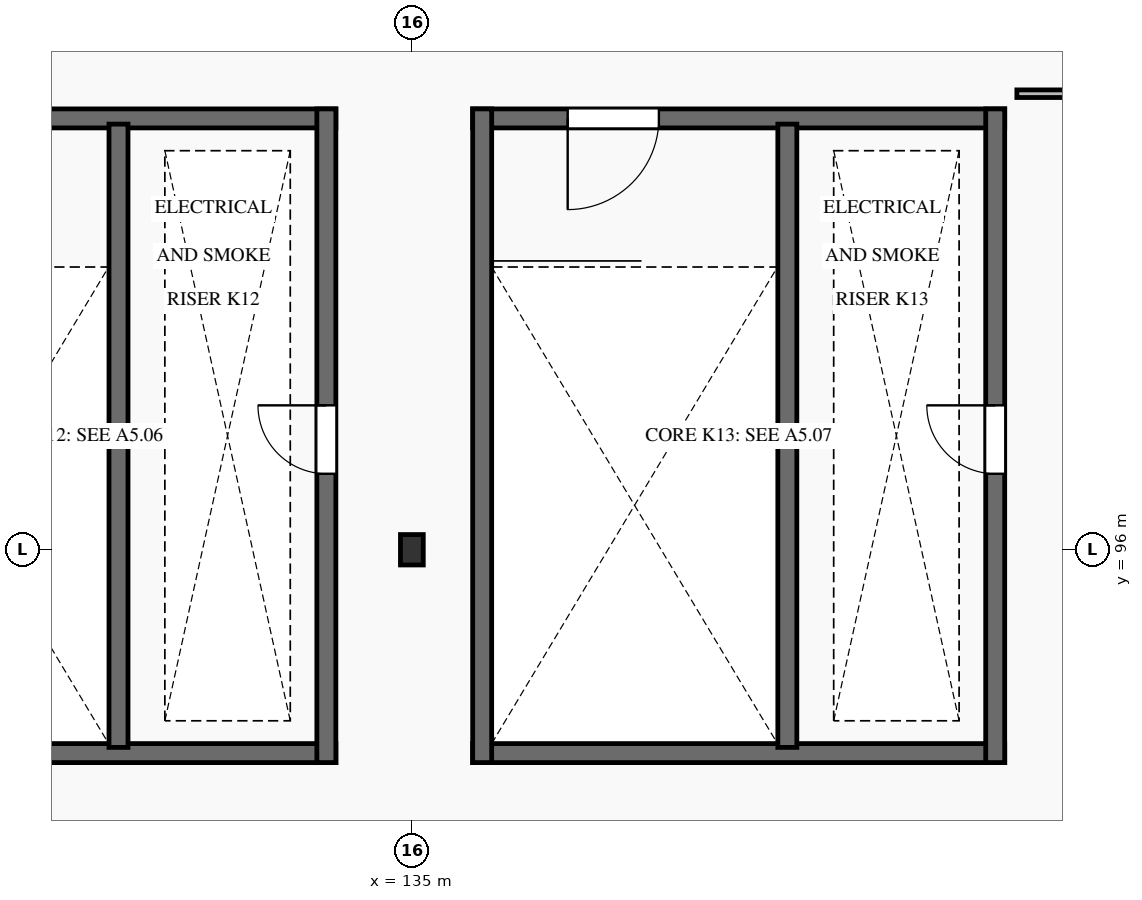
"""IFC4 building model, lengths in metres.
Left out: names, types, materials, properties, quantities, classifications, styles, units other than length and angle.
Written with IfcOpenShell. Run it as: python <this file> out.ifc"""

import sys

from ifc_helpers import new_model, si_unit, direction, frame, frame_2d, origin, origin_2d, place, context, subcontext, project, spatial, rectangle, i_section, extrude, element, fill, save


model = new_model("IFC4")
c1 = context("Model", 3, precision=1e-05, world=origin(), true_north=direction((0.0, 1.0)))
c2 = subcontext(c1, "Body", "Model", "MODEL_VIEW")
j1 = project(units=[si_unit("LENGTHUNIT", "METRE"), si_unit("PLANEANGLEUNIT", "RADIAN")], contexts=[c1])
p1 = place(None, origin())
s1 = spatial("IfcSite", under=j1, at=p1, CompositionType="ELEMENT")
p2 = place(p1, origin())
s2 = spatial("IfcBuilding", under=s1, at=p2, CompositionType="ELEMENT")
p3 = place(p2, frame((0.0, 0.0, 15.0)))
s3 = spatial("IfcBuildingStorey", under=s2, at=p3, CompositionType="ELEMENT", Elevation=15.0)
p4 = place(p3, frame((135.0, 96.0, 0.0), z_axis=(0.0, 0.0, 1.0), x_axis=(1.0, 0.0, 0.0)))
e1 = element("IfcColumn", 1, at=p4, inside=s3, PredefinedType="COLUMN", context=c2, shape_type="SweptSolid", body=[
    extrude(i_section(OverallWidth=0.3, OverallDepth=0.4, WebThickness=0.013, FlangeThickness=0.024, FilletRadius=0.027, at=origin_2d()), origin(), (0.0, 0.0, 1.0), 3.9),
])
p5 = place(p3, frame((127.0, 93.325, 0.0), z_axis=(0.0, 0.0, 1.0), x_axis=(1.0, 0.0, 0.0)))
e2 = element("IfcWall", 2, at=p5, inside=s3, PredefinedType="SHEAR", context=c2, shape_type="SweptSolid", body=[
    extrude(rectangle(XDim=7.0, YDim=0.25, at=frame_2d((3.5, 0.0))), origin(), (0.0, 0.0, 1.0), 3.9),
])
p6 = place(p3, frame((127.0, 101.675, 0.0), z_axis=(0.0, 0.0, 1.0), x_axis=(1.0, 0.0, 0.0)))
e3 = element("IfcWall", 3, at=p6, inside=s3, PredefinedType="SHEAR", context=c2, shape_type="SweptSolid", body=[
    extrude(rectangle(XDim=7.0, YDim=0.25, at=frame_2d((3.5, 0.0))), origin(), (0.0, 0.0, 1.0), 3.9),
])
p7 = place(p6, frame((1.25, 0.0, 0.0)))
e4 = element("IfcOpeningElement", 4, at=p7, cuts=e3, PredefinedType="OPENING", context=c2, shape_type="SweptSolid", body=[
    extrude(rectangle(XDim=1.2, YDim=2.15, at=frame_2d((0.6, 1.075))), frame((0.0, 0.14, 0.0), z_axis=(0.0, -1.0, 0.0), x_axis=(1.0, 0.0, 0.0)), (0.0, 0.0, 1.0), 0.28),
])
p8 = place(p3, frame((133.875, 93.2, 0.0), z_axis=(0.0, 0.0, 1.0), x_axis=(0.0, 1.0, 0.0)))
e5 = element("IfcWall", 5, at=p8, inside=s3, PredefinedType="SHEAR", context=c2, shape_type="SweptSolid", body=[
    extrude(rectangle(XDim=8.6, YDim=0.25, at=frame_2d((4.3, 0.0))), origin(), (0.0, 0.0, 1.0), 3.9),
])
p9 = place(p8, frame((3.8, 0.0, 0.0)))
e6 = element("IfcOpeningElement", 6, at=p9, cuts=e5, PredefinedType="OPENING", context=c2, shape_type="SweptSolid", body=[
    extrude(rectangle(XDim=0.9, YDim=2.05, at=frame_2d((0.45, 1.025))), frame((0.0, 0.14, 0.0), z_axis=(0.0, -1.0, 0.0), x_axis=(1.0, 0.0, 0.0)), (0.0, 0.0, 1.0), 0.28),
])
p10 = place(p3, frame((131.14, 93.4, 0.0), z_axis=(0.0, 0.0, 1.0), x_axis=(0.0, 1.0, 0.0)))
e7 = element("IfcWall", 7, at=p10, inside=s3, PredefinedType="SHEAR", context=c2, shape_type="SweptSolid", body=[
    extrude(rectangle(XDim=8.2, YDim=0.25, at=frame_2d((4.1, 0.0))), origin(), (0.0, 0.0, 1.0), 3.9),
])
p11 = place(p3, frame((135.8, 93.325, 0.0), z_axis=(0.0, 0.0, 1.0), x_axis=(1.0, 0.0, 0.0)))
e8 = element("IfcWall", 8, at=p11, inside=s3, PredefinedType="SHEAR", context=c2, shape_type="SweptSolid", body=[
    extrude(rectangle(XDim=7.0, YDim=0.25, at=frame_2d((3.5, 0.0))), origin(), (0.0, 0.0, 1.0), 3.9),
])
p12 = place(p3, frame((135.8, 101.675, 0.0), z_axis=(0.0, 0.0, 1.0), x_axis=(1.0, 0.0, 0.0)))
e9 = element("IfcWall", 9, at=p12, inside=s3, PredefinedType="SHEAR", context=c2, shape_type="SweptSolid", body=[
    extrude(rectangle(XDim=7.0, YDim=0.25, at=frame_2d((3.5, 0.0))), origin(), (0.0, 0.0, 1.0), 3.9),
])
p13 = place(p12, frame((1.25, 0.0, 0.0)))
e10 = element("IfcOpeningElement", 10, at=p13, cuts=e9, PredefinedType="OPENING", context=c2, shape_type="SweptSolid", body=[
    extrude(rectangle(XDim=1.2, YDim=2.15, at=frame_2d((0.6, 1.075))), frame((0.0, 0.14, 0.0), z_axis=(0.0, -1.0, 0.0), x_axis=(1.0, 0.0, 0.0)), (0.0, 0.0, 1.0), 0.28),
])
p14 = place(p3, frame((135.925, 93.2, 0.0), z_axis=(0.0, 0.0, 1.0), x_axis=(0.0, 1.0, 0.0)))
e11 = element("IfcWall", 11, at=p14, inside=s3, PredefinedType="SHEAR", context=c2, shape_type="SweptSolid", body=[
    extrude(rectangle(XDim=8.6, YDim=0.25, at=frame_2d((4.3, 0.0))), origin(), (0.0, 0.0, 1.0), 3.9),
])
p15 = place(p3, frame((142.675, 93.2, 0.0), z_axis=(0.0, 0.0, 1.0), x_axis=(0.0, 1.0, 0.0)))
e12 = element("IfcWall", 12, at=p15, inside=s3, PredefinedType="SHEAR", context=c2, shape_type="SweptSolid", body=[
    extrude(rectangle(XDim=8.6, YDim=0.25, at=frame_2d((4.3, 0.0))), origin(), (0.0, 0.0, 1.0), 3.9),
])
p16 = place(p15, frame((3.8, 0.0, 0.0)))
e13 = element("IfcOpeningElement", 13, at=p16, cuts=e12, PredefinedType="OPENING", context=c2, shape_type="SweptSolid", body=[
    extrude(rectangle(XDim=0.9, YDim=2.05, at=frame_2d((0.45, 1.025))), frame((0.0, 0.14, 0.0), z_axis=(0.0, -1.0, 0.0), x_axis=(1.0, 0.0, 0.0)), (0.0, 0.0, 1.0), 0.28),
])
p17 = place(p3, frame((139.94, 93.4, 0.0), z_axis=(0.0, 0.0, 1.0), x_axis=(0.0, 1.0, 0.0)))
e14 = element("IfcWall", 14, at=p17, inside=s3, PredefinedType="SHEAR", context=c2, shape_type="SweptSolid", body=[
    extrude(rectangle(XDim=8.2, YDim=0.25, at=frame_2d((4.1, 0.0))), origin(), (0.0, 0.0, 1.0), 3.9),
])
p18 = place(p3, frame((142.96, 102.0, 0.0), z_axis=(0.0, 0.0, 1.0), x_axis=(1.0, 0.0, 0.0)))
e15 = element("IfcWall", 15, at=p18, inside=s3, PredefinedType="PARTITIONING", context=c2, shape_type="SweptSolid", body=[
    extrude(rectangle(XDim=14.89, YDim=0.1, at=frame_2d((7.445, 0.0))), origin(), (0.0, 0.0, 1.0), 3.64),
])
p19 = place(p18, frame((6.545, 0.0, 0.0)))
e16 = element("IfcOpeningElement", 16, at=p19, cuts=e15, PredefinedType="OPENING", context=c2, shape_type="SweptSolid", body=[
    extrude(rectangle(XDim=1.8, YDim=2.3, at=frame_2d((0.9, 1.15))), frame((0.0, 0.065, 0.0), z_axis=(0.0, -1.0, 0.0), x_axis=(1.0, 0.0, 0.0)), (0.0, 0.0, 1.0), 0.13),
])
p20 = place(p9, origin())
e17 = element("IfcDoor", 17, at=p20, inside=s3, OperationType="SINGLE_SWING_RIGHT", PredefinedType="DOOR", context=c2, shape_type="SweptSolid", body=[
    extrude(rectangle(XDim=0.9, YDim=2.05, at=frame_2d((0.45, 1.025))), frame((0.0, 0.025, 0.0), z_axis=(0.0, -1.0, 0.0), x_axis=(1.0, 0.0, 0.0)), (0.0, 0.0, 1.0), 0.05),
])
fill(e6, e17)
p21 = place(p13, frame((1.2, 0.0, 0.0), z_axis=(0.0, 0.0, 1.0), x_axis=(-1.0, 0.0, 0.0)))
e18 = element("IfcDoor", 18, at=p21, inside=s3, OperationType="SINGLE_SWING_LEFT", PredefinedType="DOOR", context=c2, shape_type="SweptSolid", body=[
    extrude(rectangle(XDim=1.2, YDim=2.15, at=frame_2d((0.6, 1.075))), frame((0.0, 0.025, 0.0), z_axis=(0.0, -1.0, 0.0), x_axis=(1.0, 0.0, 0.0)), (0.0, 0.0, 1.0), 0.05),
])
fill(e10, e18)
p22 = place(p16, origin())
e19 = element("IfcDoor", 19, at=p22, inside=s3, OperationType="SINGLE_SWING_RIGHT", PredefinedType="DOOR", context=c2, shape_type="SweptSolid", body=[
    extrude(rectangle(XDim=0.9, YDim=2.05, at=frame_2d((0.45, 1.025))), frame((0.0, 0.025, 0.0), z_axis=(0.0, -1.0, 0.0), x_axis=(1.0, 0.0, 0.0)), (0.0, 0.0, 1.0), 0.05),
])
fill(e13, e19)
save(model, sys.argv[1])
